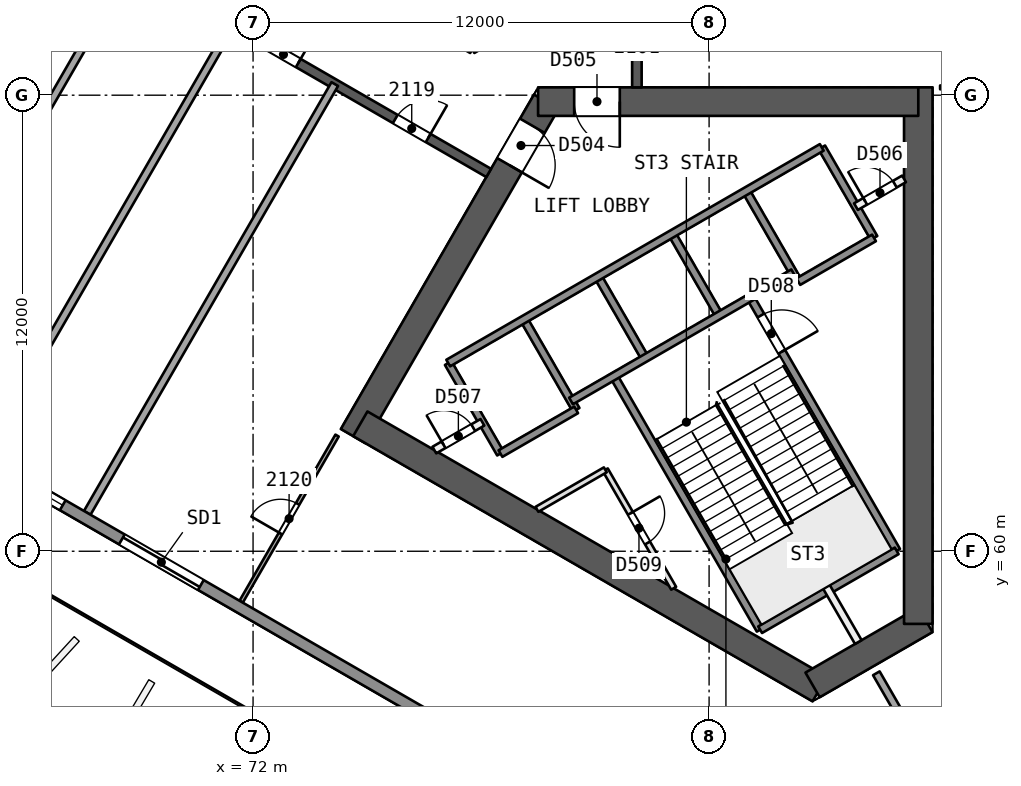
"""IFC4 building model, lengths in metres.
Left out: names, types, materials, properties, quantities, classifications, styles, units other than length and angle.
Written with IfcOpenShell. Run it as: python <this file> out.ifc"""

import sys

from ifc_helpers import new_model, si_unit, direction, frame, frame_2d, origin, place, context, subcontext, project, spatial, rectangle, extrude, element, fill, save


model = new_model("IFC4")
c1 = context("Model", 3, precision=1e-05, world=origin(), true_north=direction((0.0, 1.0)))
c2 = subcontext(c1, "Body", "Model", "MODEL_VIEW")
j1 = project(units=[si_unit("LENGTHUNIT", "METRE"), si_unit("PLANEANGLEUNIT", "RADIAN")], contexts=[c1])
p1 = place(None, origin())
s1 = spatial("IfcSite", under=j1, at=p1, CompositionType="ELEMENT")
p2 = place(p1, origin())
s2 = spatial("IfcBuilding", under=s1, at=p2, CompositionType="ELEMENT")
p3 = place(p2, frame((0.0, 0.0, 90.6)))
s3 = spatial("IfcBuildingStorey", under=s2, at=p3, CompositionType="ELEMENT", Elevation=90.6)
p4 = place(p3, frame((79.717, 71.831, 0.0), z_axis=(0.0, 0.0, 1.0), x_axis=(-0.499996230114, -0.866027580318, 0.0)))
e1 = element("IfcWall", 1, at=p4, inside=s3, PredefinedType="SHEAR", context=c2, shape_type="SweptSolid", body=[
    extrude(rectangle(XDim=10.164, YDim=0.75, at=frame_2d((5.082, 0.0))), origin(), (0.0, 0.0, 1.0), 3.7),
])
p5 = place(p4, frame((0.733, 0.0, 0.0)))
e2 = element("IfcOpeningElement", 2, at=p5, cuts=e1, PredefinedType="OPENING", context=c2, shape_type="SweptSolid", body=[
    extrude(rectangle(XDim=1.2, YDim=2.1, at=frame_2d((0.6, 1.05))), frame((0.0, 0.385, 0.0), z_axis=(0.0, -1.0, 0.0), x_axis=(1.0, 0.0, 0.0)), (0.0, 0.0, 1.0), 0.771),
])
p6 = place(p3, frame((74.822, 63.354, 0.0), z_axis=(0.0, 0.0, 1.0), x_axis=(0.8660248072, -0.500001033313, 0.0)))
e3 = element("IfcWall", 3, at=p6, inside=s3, PredefinedType="SHEAR", context=c2, shape_type="SweptSolid", body=[
    extrude(rectangle(XDim=13.958, YDim=0.75, at=frame_2d((6.979, 0.0))), origin(), (0.0, 0.0, 1.0), 3.7),
])
p7 = place(p3, frame((86.723, 56.483, 0.0), z_axis=(0.0, 0.0, 1.0), x_axis=(0.866017201164, 0.500014207086, 0.0)))
e4 = element("IfcWall", 4, at=p7, inside=s3, PredefinedType="SHEAR", context=c2, shape_type="SweptSolid", body=[
    extrude(rectangle(XDim=3.429, YDim=0.75, at=frame_2d((1.714, 0.0))), origin(), (0.0, 0.0, 1.0), 3.7),
])
p8 = place(p3, frame((89.505, 58.089, 0.0), z_axis=(0.0, 0.0, 1.0), x_axis=(0.0, 1.0, 0.0)))
e5 = element("IfcWall", 5, at=p8, inside=s3, PredefinedType="SHEAR", context=c2, shape_type="SweptSolid", body=[
    extrude(rectangle(XDim=14.117, YDim=0.75, at=frame_2d((7.059, 0.0))), origin(), (0.0, 0.0, 1.0), 3.7),
])
p9 = place(p3, frame((89.505, 71.831, 0.0), z_axis=(0.0, 0.0, 1.0), x_axis=(-1.0, 0.0, 0.0)))
e6 = element("IfcWall", 6, at=p9, inside=s3, PredefinedType="SHEAR", context=c2, shape_type="SweptSolid", body=[
    extrude(rectangle(XDim=10.005, YDim=0.75, at=frame_2d((5.002, 0.0))), origin(), (0.0, 0.0, 1.0), 3.7),
])
p10 = place(p9, frame((7.855, 0.0, 0.0)))
e7 = element("IfcOpeningElement", 7, at=p10, cuts=e6, PredefinedType="OPENING", context=c2, shape_type="SweptSolid", body=[
    extrude(rectangle(XDim=1.2, YDim=2.1, at=frame_2d((0.6, 1.05))), frame((0.0, 0.385, 0.0), z_axis=(0.0, -1.0, 0.0), x_axis=(1.0, 0.0, 0.0)), (0.0, 0.0, 1.0), 0.771),
])
p11 = place(p3, frame((82.1, 72.206, 0.0), z_axis=(0.0, 0.0, 1.0), x_axis=(0.0, 1.0, 0.0)))
e8 = element("IfcWall", 8, at=p11, inside=s3, PredefinedType="SHEAR", context=c2, shape_type="SweptSolid", body=[
    extrude(rectangle(XDim=15.588, YDim=0.25, at=frame_2d((7.794, 0.0))), origin(), (0.0, 0.0, 1.0), 3.2),
])
p12 = place(p11, frame((1.527, 0.0, 0.0)))
e9 = element("IfcOpeningElement", 9, at=p12, cuts=e8, PredefinedType="OPENING", context=c2, shape_type="SweptSolid", body=[
    extrude(rectangle(XDim=1.0, YDim=2.1, at=frame_2d((0.5, 1.05))), frame((0.0, 0.135, 0.0), z_axis=(0.0, -1.0, 0.0), x_axis=(1.0, 0.0, 0.0)), (0.0, 0.0, 1.0), 0.271),
])
p13 = place(p11, frame((8.694, 0.0, 0.0)))
e10 = element("IfcOpeningElement", 10, at=p13, cuts=e8, PredefinedType="OPENING", context=c2, shape_type="SweptSolid", body=[
    extrude(rectangle(XDim=1.1, YDim=2.1, at=frame_2d((0.55, 1.05))), frame((0.0, 0.135, 0.0), z_axis=(0.0, -1.0, 0.0), x_axis=(1.0, 0.0, 0.0)), (0.0, 0.0, 1.0), 0.271),
])
p14 = place(p11, frame((13.062, 0.0, 0.0)))
e11 = element("IfcOpeningElement", 11, at=p14, cuts=e8, PredefinedType="OPENING", context=c2, shape_type="SweptSolid", body=[
    extrude(rectangle(XDim=1.0, YDim=2.1, at=frame_2d((0.5, 1.05))), frame((0.0, 0.135, 0.0), z_axis=(0.0, -1.0, 0.0), x_axis=(1.0, 0.0, 0.0)), (0.0, 0.0, 1.0), 0.271),
])
p15 = place(p3, frame((64.7, 77.748, 0.0), z_axis=(0.0, 0.0, 1.0), x_axis=(0.866026492143, -0.499998114903, 0.0)))
e12 = element("IfcWall", 12, at=p15, inside=s3, PredefinedType="SHEAR", context=c2, shape_type="SweptSolid", body=[
    extrude(rectangle(XDim=15.588, YDim=0.25, at=frame_2d((7.794, 0.0))), origin(), (0.0, 0.0, 1.0), 3.2),
])
p16 = place(p15, frame((1.738, 0.0, 0.0)))
e13 = element("IfcOpeningElement", 13, at=p16, cuts=e12, PredefinedType="OPENING", context=c2, shape_type="SweptSolid", body=[
    extrude(rectangle(XDim=1.2, YDim=2.4, at=frame_2d((0.6, 1.2))), frame((0.0, 0.135, 0.0), z_axis=(0.0, -1.0, 0.0), x_axis=(1.0, 0.0, 0.0)), (0.0, 0.0, 1.0), 0.271),
])
p17 = place(p15, frame((5.785, 0.0, 0.0)))
e14 = element("IfcOpeningElement", 14, at=p17, cuts=e12, PredefinedType="OPENING", context=c2, shape_type="SweptSolid", body=[
    extrude(rectangle(XDim=0.9, YDim=2.1, at=frame_2d((0.45, 1.05))), frame((0.0, 0.135, 0.0), z_axis=(0.0, -1.0, 0.0), x_axis=(1.0, 0.0, 0.0)), (0.0, 0.0, 1.0), 0.271),
])
p18 = place(p15, frame((8.903, 0.0, 0.0)))
e15 = element("IfcOpeningElement", 15, at=p18, cuts=e12, PredefinedType="OPENING", context=c2, shape_type="SweptSolid", body=[
    extrude(rectangle(XDim=0.9, YDim=2.1, at=frame_2d((0.45, 1.05))), frame((0.0, 0.135, 0.0), z_axis=(0.0, -1.0, 0.0), x_axis=(1.0, 0.0, 0.0)), (0.0, 0.0, 1.0), 0.271),
])
p19 = place(p15, frame((12.75, 0.0, 0.0)))
e16 = element("IfcOpeningElement", 16, at=p19, cuts=e12, PredefinedType="OPENING", context=c2, shape_type="SweptSolid", body=[
    extrude(rectangle(XDim=1.0, YDim=2.1, at=frame_2d((0.5, 1.05))), frame((0.0, 0.135, 0.0), z_axis=(0.0, -1.0, 0.0), x_axis=(1.0, 0.0, 0.0)), (0.0, 0.0, 1.0), 0.271),
])
p20 = place(p3, frame((90.079, 72.206, 0.0), z_axis=(0.0, 0.0, 1.0), x_axis=(1.0, 0.0, 0.0)))
e17 = element("IfcWall", 17, at=p20, inside=s3, PredefinedType="PARTITIONING", context=c2, shape_type="SweptSolid", body=[
    extrude(rectangle(XDim=5.048, YDim=0.1, at=frame_2d((2.524, 0.0))), origin(), (0.0, 0.0, 1.0), 3.2),
])
p21 = place(p20, frame((2.074, 0.0, 0.0)))
e18 = element("IfcOpeningElement", 18, at=p21, cuts=e17, PredefinedType="OPENING", context=c2, shape_type="SweptSolid", body=[
    extrude(rectangle(XDim=0.9, YDim=2.1, at=frame_2d((0.45, 1.05))), frame((0.0, 0.061, 0.0), z_axis=(0.0, -1.0, 0.0), x_axis=(1.0, 0.0, 0.0)), (0.0, 0.0, 1.0), 0.121),
])
p22 = place(p3, frame((88.401, 56.789, 0.0), z_axis=(0.0, 0.0, 1.0), x_axis=(0.500002227119, -0.866024117953, 0.0)))
e19 = element("IfcWall", 19, at=p22, inside=s3, PredefinedType="PARTITIONING", context=c2, shape_type="SweptSolid", body=[
    extrude(rectangle(XDim=8.435, YDim=0.2, at=frame_2d((4.218, 0.0))), origin(), (0.0, 0.0, 1.0), 3.2),
])
for number, where, z_axis, x_axis in (
    (20, (62.236, 64.128, 0.0), (0.0, 0.0, 1.0), (0.5, 0.866, 0.0)),
    (21, (64.936, 62.569, 0.0), (0.0, 0.0, 1.0), (0.5, 0.866, 0.0)),
    (22, (67.636, 61.01, 0.0), (0.0, 0.0, 1.0), (0.5, 0.866, 0.0)),
):
    element("IfcWall", number, at=place(p3, frame(where, z_axis=z_axis, x_axis=x_axis)), inside=s3, PredefinedType="PARTITIONING", context=c2, shape_type="SweptSolid", body=[
        extrude(rectangle(XDim=13.028, YDim=0.2, at=frame_2d((6.514, 0.0))), origin(), (0.0, 0.0, 1.0), 3.2),
    ])
p23 = place(p3, frame((71.686, 58.672, 0.0), z_axis=(0.0, 0.0, 1.0), x_axis=(0.49997221919, 0.866041442448, 0.0)))
e23 = element("IfcWall", 23, at=p23, inside=s3, PredefinedType="PARTITIONING", context=c2, shape_type="SweptSolid", body=[
    extrude(rectangle(XDim=5.049, YDim=0.1, at=frame_2d((2.524, 0.0))), origin(), (0.0, 0.0, 1.0), 3.2),
])
p24 = place(p23, frame((2.074, 0.0, 0.0)))
e24 = element("IfcOpeningElement", 24, at=p24, cuts=e23, PredefinedType="OPENING", context=c2, shape_type="SweptSolid", body=[
    extrude(rectangle(XDim=0.9, YDim=2.1, at=frame_2d((0.45, 1.05))), frame((0.0, 0.061, 0.0), z_axis=(0.0, -1.0, 0.0), x_axis=(1.0, 0.0, 0.0)), (0.0, 0.0, 1.0), 0.121),
])
p25 = place(p3, frame((90.11, 47.863, 0.0), z_axis=(0.0, 0.0, 1.0), x_axis=(-0.866024236478, 0.500002021829, 0.0)))
e25 = element("IfcWall", 25, at=p25, inside=s3, PredefinedType="SOLIDWALL", context=c2, shape_type="SweptSolid", body=[
    extrude(rectangle(XDim=58.307, YDim=0.3, at=frame_2d((29.154, 0.0))), origin(), (0.0, 0.0, 1.0), 3.2),
])
p26 = place(p25, frame((44.133, 0.0, 0.0)))
e26 = element("IfcOpeningElement", 26, at=p26, cuts=e25, PredefinedType="OPENING", context=c2, shape_type="SweptSolid", body=[
    extrude(rectangle(XDim=2.4, YDim=2.4, at=frame_2d((1.2, 1.2))), frame((0.0, 0.161, 0.0), z_axis=(0.0, -1.0, 0.0), x_axis=(1.0, 0.0, 0.0)), (0.0, 0.0, 1.0), 0.321),
])
p27 = place(p25, frame((22.498, 0.0, 0.0)))
e27 = element("IfcOpeningElement", 27, at=p27, cuts=e25, PredefinedType="OPENING", context=c2, shape_type="SweptSolid", body=[
    extrude(rectangle(XDim=2.4, YDim=2.4, at=frame_2d((1.2, 1.2))), frame((0.0, 0.161, 0.0), z_axis=(0.0, -1.0, 0.0), x_axis=(1.0, 0.0, 0.0)), (0.0, 0.0, 1.0), 0.321),
])
p28 = place(p25, frame((10.65, 0.0, 0.0)))
e28 = element("IfcOpeningElement", 28, at=p28, cuts=e25, PredefinedType="OPENING", context=c2, shape_type="SweptSolid", body=[
    extrude(rectangle(XDim=2.4, YDim=2.4, at=frame_2d((1.2, 1.2))), frame((0.0, 0.161, 0.0), z_axis=(0.0, -1.0, 0.0), x_axis=(1.0, 0.0, 0.0)), (0.0, 0.0, 1.0), 0.321),
])
p29 = place(p25, frame((29.812, 0.0, 0.9)))
e29 = element("IfcOpeningElement", 29, at=p29, cuts=e25, PredefinedType="OPENING", context=c2, shape_type="SweptSolid", body=[
    extrude(rectangle(XDim=1.8, YDim=1.5, at=frame_2d((0.9, 0.75))), frame((0.0, 0.161, 0.0), z_axis=(0.0, -1.0, 0.0), x_axis=(1.0, 0.0, 0.0)), (0.0, 0.0, 1.0), 0.321),
])
p30 = place(p25, frame((26.695, 0.0, 0.9)))
e30 = element("IfcOpeningElement", 30, at=p30, cuts=e25, PredefinedType="OPENING", context=c2, shape_type="SweptSolid", body=[
    extrude(rectangle(XDim=1.8, YDim=1.5, at=frame_2d((0.9, 0.75))), frame((0.0, 0.161, 0.0), z_axis=(0.0, -1.0, 0.0), x_axis=(1.0, 0.0, 0.0)), (0.0, 0.0, 1.0), 0.321),
])
p31 = place(p3, frame((77.135, 64.952, 0.0), z_axis=(0.0, 0.0, 1.0), x_axis=(0.499996545922, -0.866027397988, 0.0)))
e31 = element("IfcWall", 31, at=p31, inside=s3, PredefinedType="SOLIDWALL", context=c2, shape_type="SweptSolid", body=[
    extrude(rectangle(XDim=2.75, YDim=0.2, at=frame_2d((1.375, 0.0))), origin(), (0.0, 0.0, 1.0), 3.2),
])
p32 = place(p3, frame((81.269, 62.142, 0.0), z_axis=(0.0, 0.0, 1.0), x_axis=(0.500043557135, -0.866000254601, 0.0)))
e32 = element("IfcWall", 32, at=p32, inside=s3, PredefinedType="PARTITIONING", context=c2, shape_type="SweptSolid", body=[
    extrude(rectangle(XDim=3.598, YDim=0.15, at=frame_2d((1.799, 0.0))), origin(), (0.0, 0.0, 1.0), 3.2),
])
p33 = place(p32, frame((1.322, 0.0, 0.0)))
e33 = element("IfcOpeningElement", 33, at=p33, cuts=e32, PredefinedType="OPENING", context=c2, shape_type="SweptSolid", body=[
    extrude(rectangle(XDim=0.9, YDim=2.1, at=frame_2d((0.45, 1.05))), frame((0.0, 0.085, 0.0), z_axis=(0.0, -1.0, 0.0), x_axis=(1.0, 0.0, 0.0)), (0.0, 0.0, 1.0), 0.171),
])
p34 = place(p3, frame((79.127, 66.102, 0.0), z_axis=(0.0, 0.0, 1.0), x_axis=(0.499996545922, -0.866027397988, 0.0)))
e34 = element("IfcWall", 34, at=p34, inside=s3, PredefinedType="SOLIDWALL", context=c2, shape_type="SweptSolid", body=[
    extrude(rectangle(XDim=2.75, YDim=0.2, at=frame_2d((1.375, 0.0))), origin(), (0.0, 0.0, 1.0), 3.2),
])
p35 = place(p3, frame((81.493, 64.604, 0.0), z_axis=(0.0, 0.0, 1.0), x_axis=(0.500006057782, -0.866021906294, 0.0)))
e35 = element("IfcWall", 35, at=p35, inside=s3, PredefinedType="SOLIDWALL", context=c2, shape_type="SweptSolid", body=[
    extrude(rectangle(XDim=7.7, YDim=0.2, at=frame_2d((3.85, 0.0))), origin(), (0.0, 0.0, 1.0), 3.2),
])
p36 = place(p3, frame((81.076, 67.227, 0.0), z_axis=(0.0, 0.0, 1.0), x_axis=(0.50000366821, -0.866023285932, 0.0)))
e36 = element("IfcWall", 36, at=p36, inside=s3, PredefinedType="SOLIDWALL", context=c2, shape_type="SweptSolid", body=[
    extrude(rectangle(XDim=2.48, YDim=0.2, at=frame_2d((1.24, 0.0))), origin(), (0.0, 0.0, 1.0), 3.2),
])
p37 = place(p3, frame((87.09, 59.06, 0.0), z_axis=(0.0, 0.0, 1.0), x_axis=(0.499937194881, -0.866061661301, 0.0)))
e37 = element("IfcWall", 37, at=p37, inside=s3, PredefinedType="PARTITIONING", context=c2, shape_type="SweptSolid", body=[
    extrude(rectangle(XDim=1.673, YDim=0.2, at=frame_2d((0.836, 0.0))), origin(), (0.0, 0.0, 1.0), 3.2),
])
p38 = place(p3, frame((83.024, 68.352, 0.0), z_axis=(0.0, 0.0, 1.0), x_axis=(0.50000366821, -0.866023285932, 0.0)))
e38 = element("IfcWall", 38, at=p38, inside=s3, PredefinedType="SOLIDWALL", context=c2, shape_type="SweptSolid", body=[
    extrude(rectangle(XDim=2.48, YDim=0.2, at=frame_2d((1.24, 0.0))), origin(), (0.0, 0.0, 1.0), 3.2),
])
p39 = place(p3, frame((85.087, 66.679, 0.0), z_axis=(0.0, 0.0, 1.0), x_axis=(0.500019787375, -0.866013979237, 0.0)))
e39 = element("IfcWall", 39, at=p39, inside=s3, PredefinedType="SOLIDWALL", context=c2, shape_type="SweptSolid", body=[
    extrude(rectangle(XDim=7.7, YDim=0.2, at=frame_2d((3.85, 0.0))), origin(), (0.0, 0.0, 1.0), 3.2),
])
p40 = place(p39, frame((0.55, 0.0, 0.0)))
e40 = element("IfcOpeningElement", 40, at=p40, cuts=e39, PredefinedType="OPENING", context=c2, shape_type="SweptSolid", body=[
    extrude(rectangle(XDim=1.1, YDim=2.1, at=frame_2d((0.55, 1.05))), frame((0.0, 0.11, 0.0), z_axis=(0.0, -1.0, 0.0), x_axis=(1.0, 0.0, 0.0)), (0.0, 0.0, 1.0), 0.221),
])
for number, where, z_axis, x_axis in (
    (41, (84.973, 69.477, 0.0), (0.0, 0.0, 1.0), (0.5, -0.866, 0.0)),
    (42, (86.965, 70.626, 0.0), (0.0, 0.0, 1.0), (0.5, -0.866, 0.0)),
):
    element("IfcWall", number, at=place(p3, frame(where, z_axis=z_axis, x_axis=x_axis)), inside=s3, PredefinedType="SOLIDWALL", context=c2, shape_type="SweptSolid", body=[
        extrude(rectangle(XDim=2.75, YDim=0.2, at=frame_2d((1.375, 0.0))), origin(), (0.0, 0.0, 1.0), 3.2),
    ])
p41 = place(p3, frame((77.135, 64.952, 0.0), z_axis=(0.0, 0.0, 1.0), x_axis=(0.866031916153, 0.499988720078, 0.0)))
e43 = element("IfcWall", 43, at=p41, inside=s3, PredefinedType="SOLIDWALL", context=c2, shape_type="SweptSolid", body=[
    extrude(rectangle(XDim=11.35, YDim=0.2, at=frame_2d((5.675, 0.0))), origin(), (0.0, 0.0, 1.0), 3.2),
])
p42 = place(p3, frame((76.77, 62.662, 0.0), z_axis=(0.0, 0.0, 1.0), x_axis=(0.866054810376, 0.49994906283, 0.0)))
e44 = element("IfcWall", 44, at=p42, inside=s3, PredefinedType="PARTITIONING", context=c2, shape_type="SweptSolid", body=[
    extrude(rectangle(XDim=1.461, YDim=0.2, at=frame_2d((0.73, 0.0))), origin(), (0.0, 0.0, 1.0), 3.2),
])
p43 = place(p42, frame((0.281, 0.0, 0.0)))
e45 = element("IfcOpeningElement", 45, at=p43, cuts=e44, PredefinedType="OPENING", context=c2, shape_type="SweptSolid", body=[
    extrude(rectangle(XDim=0.9, YDim=2.1, at=frame_2d((0.45, 1.05))), frame((0.0, 0.11, 0.0), z_axis=(0.0, -1.0, 0.0), x_axis=(1.0, 0.0, 0.0)), (0.0, 0.0, 1.0), 0.221),
])
p44 = place(p3, frame((87.865, 69.068, 0.0), z_axis=(0.0, 0.0, 1.0), x_axis=(0.865982457891, 0.500074377092, 0.0)))
e46 = element("IfcWall", 46, at=p44, inside=s3, PredefinedType="PARTITIONING", context=c2, shape_type="SweptSolid", body=[
    extrude(rectangle(XDim=1.461, YDim=0.2, at=frame_2d((0.73, 0.0))), origin(), (0.0, 0.0, 1.0), 3.2),
])
p45 = place(p44, frame((0.281, 0.0, 0.0)))
e47 = element("IfcOpeningElement", 47, at=p45, cuts=e46, PredefinedType="OPENING", context=c2, shape_type="SweptSolid", body=[
    extrude(rectangle(XDim=0.9, YDim=2.1, at=frame_2d((0.45, 1.05))), frame((0.0, 0.11, 0.0), z_axis=(0.0, -1.0, 0.0), x_axis=(1.0, 0.0, 0.0)), (0.0, 0.0, 1.0), 0.221),
])
p46 = place(p3, frame((80.367, 63.954, 0.0), z_axis=(0.0, 0.0, 1.0), x_axis=(0.866026575979, 0.499997969693, 0.0)))
e48 = element("IfcWall", 48, at=p46, inside=s3, PredefinedType="SOLIDWALL", context=c2, shape_type="SweptSolid", body=[
    extrude(rectangle(XDim=6.75, YDim=0.2, at=frame_2d((3.375, 0.0))), origin(), (0.0, 0.0, 1.0), 3.2),
])
p47 = place(p3, frame((78.51, 62.57, 0.0), z_axis=(0.0, 0.0, 1.0), x_axis=(0.866053019151, 0.499952165731, 0.0)))
e49 = element("IfcWall", 49, at=p47, inside=s3, PredefinedType="SOLIDWALL", context=c2, shape_type="SweptSolid", body=[
    extrude(rectangle(XDim=2.3, YDim=0.2, at=frame_2d((1.15, 0.0))), origin(), (0.0, 0.0, 1.0), 3.2),
])
p48 = place(p3, frame((86.348, 67.095, 0.0), z_axis=(0.0, 0.0, 1.0), x_axis=(0.86602648383, 0.499998129301, 0.0)))
e50 = element("IfcWall", 50, at=p48, inside=s3, PredefinedType="SOLIDWALL", context=c2, shape_type="SweptSolid", body=[
    extrude(rectangle(XDim=2.3, YDim=0.2, at=frame_2d((1.15, 0.0))), origin(), (0.0, 0.0, 1.0), 3.2),
])
p49 = place(p3, frame((79.47, 61.103, 0.0), z_axis=(0.0, 0.0, 1.0), x_axis=(0.866021168401, 0.500007335828, 0.0)))
e51 = element("IfcWall", 51, at=p49, inside=s3, PredefinedType="PARTITIONING", context=c2, shape_type="SweptSolid", body=[
    extrude(rectangle(XDim=2.077, YDim=0.15, at=frame_2d((1.039, 0.0))), origin(), (0.0, 0.0, 1.0), 3.2),
])
p50 = place(p3, frame((85.343, 57.935, 0.0), z_axis=(0.0, 0.0, 1.0), x_axis=(0.866004344652, 0.500036473714, 0.0)))
e52 = element("IfcWall", 52, at=p50, inside=s3, PredefinedType="SOLIDWALL", context=c2, shape_type="SweptSolid", body=[
    extrude(rectangle(XDim=4.15, YDim=0.2, at=frame_2d((2.075, 0.0))), origin(), (0.0, 0.0, 1.0), 3.2),
])
p51 = place(p3, frame((67.702, 78.948, 0.0), z_axis=(0.0, 0.0, 1.0), x_axis=(0.866026658274, -0.499997827154, 0.0)))
e53 = element("IfcWall", 53, at=p51, inside=s3, PredefinedType="PARTITIONING", context=c2, shape_type="SweptSolid", body=[
    extrude(rectangle(XDim=11.588, YDim=0.1, at=frame_2d((5.794, 0.0))), origin(), (0.0, 0.0, 1.0), 3.2),
])
p52 = place(p3, frame((77.798, 73.154, 0.0), z_axis=(0.0, 0.0, 1.0), x_axis=(0.866041268327, 0.499972520799, 0.0)))
e54 = element("IfcWall", 54, at=p52, inside=s3, PredefinedType="PARTITIONING", context=c2, shape_type="SweptSolid", body=[
    extrude(rectangle(XDim=2.0, YDim=0.1, at=frame_2d((1.0, 0.0))), origin(), (0.0, 0.0, 1.0), 3.2),
])
p53 = place(p18, origin())
e55 = element("IfcDoor", 55, at=p53, inside=s3, OperationType="SINGLE_SWING_RIGHT", PredefinedType="NOTDEFINED", context=c2, shape_type="SweptSolid", body=[
    extrude(rectangle(XDim=0.9, YDim=2.1, at=frame_2d((0.45, 1.05))), frame((0.0, 0.025, 0.0), z_axis=(0.0, -1.0, 0.0), x_axis=(1.0, 0.0, 0.0)), (0.0, 0.0, 1.0), 0.05),
])
fill(e15, e55)
p54 = place(p19, origin())
e56 = element("IfcDoor", 56, at=p54, inside=s3, OperationType="SINGLE_SWING_RIGHT", PredefinedType="NOTDEFINED", context=c2, shape_type="SweptSolid", body=[
    extrude(rectangle(XDim=1.0, YDim=2.1, at=frame_2d((0.5, 1.05))), frame((0.0, 0.025, 0.0), z_axis=(0.0, -1.0, 0.0), x_axis=(1.0, 0.0, 0.0)), (0.0, 0.0, 1.0), 0.05),
])
fill(e16, e56)
p55 = place(p24, origin())
e57 = element("IfcDoor", 57, at=p55, inside=s3, OperationType="SINGLE_SWING_LEFT", PredefinedType="NOTDEFINED", context=c2, shape_type="SweptSolid", body=[
    extrude(rectangle(XDim=0.9, YDim=2.1, at=frame_2d((0.45, 1.05))), frame((0.0, 0.025, 0.0), z_axis=(0.0, -1.0, 0.0), x_axis=(1.0, 0.0, 0.0)), (0.0, 0.0, 1.0), 0.05),
])
fill(e24, e57)
p56 = place(p27, origin())
e58 = element("IfcDoor", 58, at=p56, inside=s3, OperationType="SLIDING_TO_RIGHT", PredefinedType="NOTDEFINED", context=c2, shape_type="SweptSolid", body=[
    extrude(rectangle(XDim=2.4, YDim=2.4, at=frame_2d((1.2, 1.2))), frame((0.0, 0.025, 0.0), z_axis=(0.0, -1.0, 0.0), x_axis=(1.0, 0.0, 0.0)), (0.0, 0.0, 1.0), 0.05),
])
fill(e27, e58)
p57 = place(p30, origin())
e59 = element("IfcWindow", 59, at=p57, inside=s3, PartitioningType="SINGLE_PANEL", PredefinedType="WINDOW", context=c2, shape_type="SweptSolid", body=[
    extrude(rectangle(XDim=1.8, YDim=1.5, at=frame_2d((0.9, 0.75))), frame((0.0, 0.03, 0.0), z_axis=(0.0, -1.0, 0.0), x_axis=(1.0, 0.0, 0.0)), (0.0, 0.0, 1.0), 0.06),
])
fill(e30, e59)
p58 = place(p5, origin())
e60 = element("IfcDoor", 60, at=p58, inside=s3, OperationType="SINGLE_SWING_RIGHT", PredefinedType="NOTDEFINED", context=c2, shape_type="SweptSolid", body=[
    extrude(rectangle(XDim=1.2, YDim=2.1, at=frame_2d((0.6, 1.05))), frame((0.0, 0.025, 0.0), z_axis=(0.0, -1.0, 0.0), x_axis=(1.0, 0.0, 0.0)), (0.0, 0.0, 1.0), 0.05),
])
fill(e2, e60)
p59 = place(p10, origin())
e61 = element("IfcDoor", 61, at=p59, inside=s3, OperationType="SINGLE_SWING_LEFT", PredefinedType="NOTDEFINED", context=c2, shape_type="SweptSolid", body=[
    extrude(rectangle(XDim=1.2, YDim=2.1, at=frame_2d((0.6, 1.05))), frame((0.0, 0.025, 0.0), z_axis=(0.0, -1.0, 0.0), x_axis=(1.0, 0.0, 0.0)), (0.0, 0.0, 1.0), 0.05),
])
fill(e7, e61)
p60 = place(p45, origin())
e62 = element("IfcDoor", 62, at=p60, inside=s3, OperationType="SINGLE_SWING_LEFT", PredefinedType="NOTDEFINED", context=c2, shape_type="SweptSolid", body=[
    extrude(rectangle(XDim=0.9, YDim=2.1, at=frame_2d((0.45, 1.05))), frame((0.0, 0.025, 0.0), z_axis=(0.0, -1.0, 0.0), x_axis=(1.0, 0.0, 0.0)), (0.0, 0.0, 1.0), 0.05),
])
fill(e47, e62)
p61 = place(p43, origin())
e63 = element("IfcDoor", 63, at=p61, inside=s3, OperationType="SINGLE_SWING_LEFT", PredefinedType="NOTDEFINED", context=c2, shape_type="SweptSolid", body=[
    extrude(rectangle(XDim=0.9, YDim=2.1, at=frame_2d((0.45, 1.05))), frame((0.0, 0.025, 0.0), z_axis=(0.0, -1.0, 0.0), x_axis=(1.0, 0.0, 0.0)), (0.0, 0.0, 1.0), 0.05),
])
fill(e45, e63)
p62 = place(p40, origin())
e64 = element("IfcDoor", 64, at=p62, inside=s3, OperationType="SINGLE_SWING_RIGHT", PredefinedType="NOTDEFINED", context=c2, shape_type="SweptSolid", body=[
    extrude(rectangle(XDim=1.1, YDim=2.1, at=frame_2d((0.55, 1.05))), frame((0.0, 0.025, 0.0), z_axis=(0.0, -1.0, 0.0), x_axis=(1.0, 0.0, 0.0)), (0.0, 0.0, 1.0), 0.05),
])
fill(e40, e64)
p63 = place(p33, origin())
e65 = element("IfcDoor", 65, at=p63, inside=s3, OperationType="SINGLE_SWING_LEFT", PredefinedType="NOTDEFINED", context=c2, shape_type="SweptSolid", body=[
    extrude(rectangle(XDim=0.9, YDim=2.1, at=frame_2d((0.45, 1.05))), frame((0.0, 0.025, 0.0), z_axis=(0.0, -1.0, 0.0), x_axis=(1.0, 0.0, 0.0)), (0.0, 0.0, 1.0), 0.05),
])
fill(e33, e65)
save(model, sys.argv[1])
